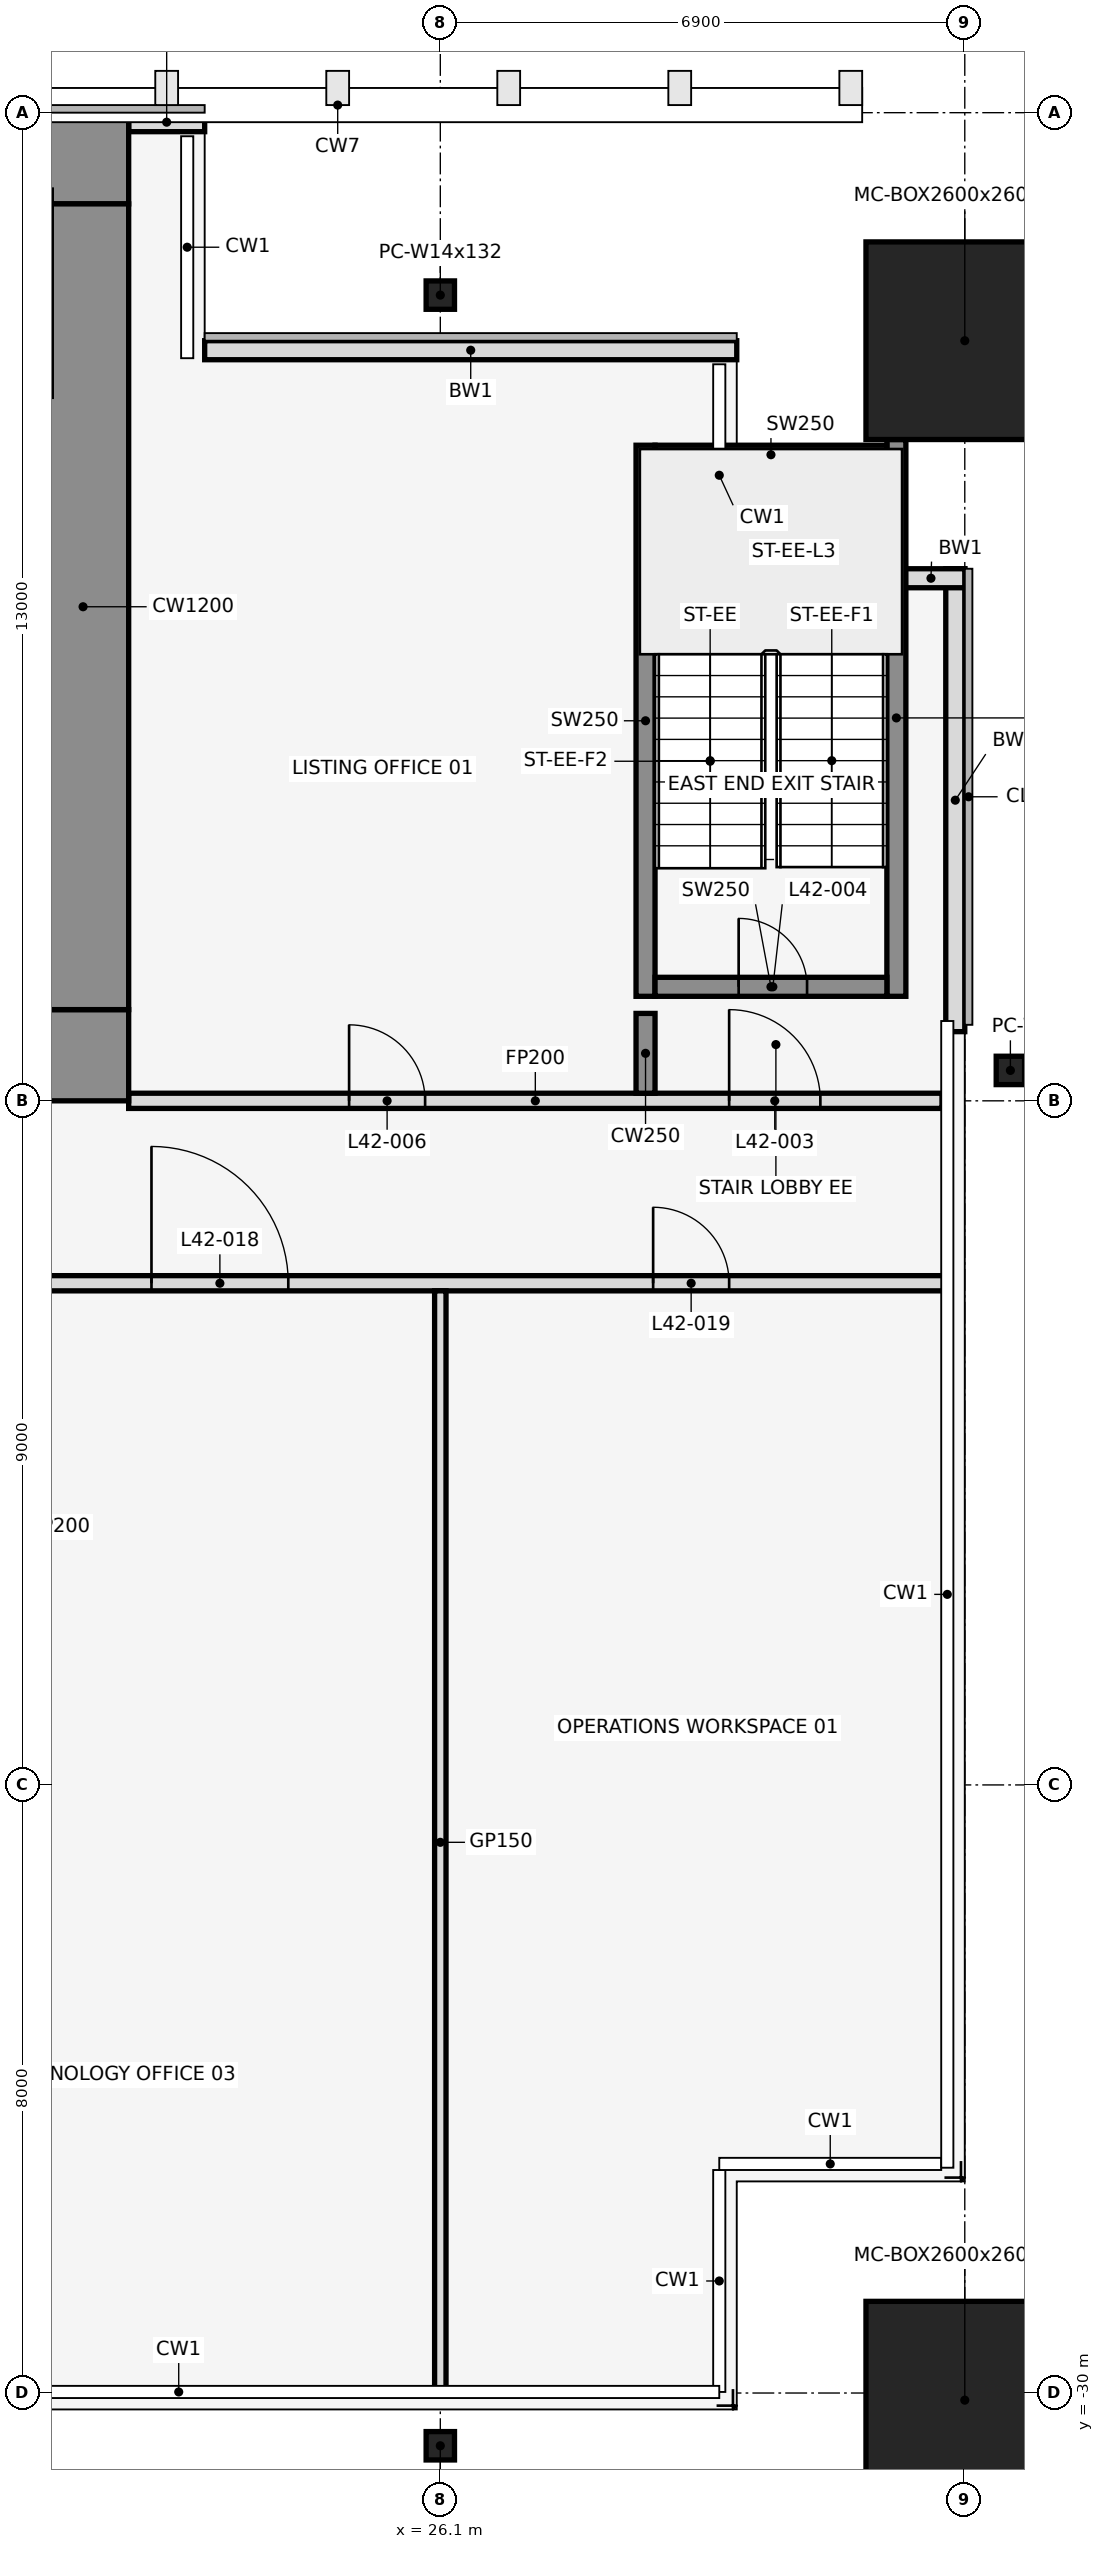
"""IFC4 building model, lengths in metres.
Left out: names, types, materials, properties, quantities, classifications, styles, units other than length and angle.
Written with IfcOpenShell. Run it as: python <this file> out.ifc"""

import sys

from ifc_helpers import new_model, si_unit, direction, frame, frame_2d, origin, origin_2d, place, context, subcontext, project, spatial, rectangle, hollow_rectangle, i_section, extrude, element, fill, save


model = new_model("IFC4")
c1 = context("Model", 3, precision=1e-05, world=origin(), true_north=direction((0.0, 1.0)))
c2 = subcontext(c1, "Body", "Model", "MODEL_VIEW")
j1 = project(units=[si_unit("LENGTHUNIT", "METRE"), si_unit("PLANEANGLEUNIT", "RADIAN")], contexts=[c1])
p1 = place(None, origin())
s1 = spatial("IfcSite", under=j1, at=p1, CompositionType="ELEMENT")
p2 = place(p1, origin())
s2 = spatial("IfcBuilding", under=s1, at=p2, CompositionType="ELEMENT")
p3 = place(p2, frame((0.0, 0.0, 190.9)))
s3 = spatial("IfcBuildingStorey", under=s2, at=p3, CompositionType="ELEMENT", Elevation=190.9)
for number, where, z_axis, x_axis in (
    (1, (26.1, -30.694, 0.0), (0.0, 0.0, 1.0), (1.0, 0.0, 0.0)),
    (2, (26.1, -2.4, 0.0), (0.0, 0.0, 1.0), (1.0, 0.0, 0.0)),
):
    element("IfcColumn", number, at=place(p3, frame(where, z_axis=z_axis, x_axis=x_axis)), inside=s3, PredefinedType="COLUMN", context=c2, shape_type="SweptSolid", body=[
        extrude(i_section(OverallWidth=0.373, OverallDepth=0.373, WebThickness=0.016, FlangeThickness=0.026, at=origin_2d()), origin(), (0.0, 0.0, 1.0), 4.1),
    ])
for number, where, z_axis, x_axis in (
    (3, (33.0, -30.094, 0.0), (0.0, 0.0, 1.0), (1.0, 0.0, 0.0)),
    (4, (33.0, -3.0, 0.0), (0.0, 0.0, 1.0), (1.0, 0.0, 0.0)),
):
    element("IfcColumn", number, at=place(p3, frame(where, z_axis=z_axis, x_axis=x_axis)), inside=s3, PredefinedType="COLUMN", context=c2, shape_type="SweptSolid", body=[
        extrude(hollow_rectangle(XDim=2.6, YDim=2.6, WallThickness=0.07, at=origin_2d()), origin(), (0.0, 0.0, 1.0), 4.1),
    ])
p4 = place(p3, frame((33.6, -12.6, 0.0), z_axis=(0.0, 0.0, 1.0), x_axis=(1.0, 0.0, 0.0)))
e5 = element("IfcColumn", 5, at=p4, inside=s3, PredefinedType="COLUMN", context=c2, shape_type="SweptSolid", body=[
    extrude(i_section(OverallWidth=0.373, OverallDepth=0.373, WebThickness=0.016, FlangeThickness=0.026, at=origin_2d()), origin(), (0.0, 0.0, 1.0), 4.1),
])
p5 = place(p3, frame((32.875, -12.09, 0.0), z_axis=(0.0, 0.0, 1.0), x_axis=(0.0, 1.0, 0.0)))
e6 = element("IfcWall", 6, at=p5, inside=s3, PredefinedType="STANDARD", context=c2, shape_type="SweptSolid", body=[
    extrude(rectangle(XDim=6.09, YDim=0.25, at=frame_2d((3.045, 0.0))), origin(), (0.0, 0.0, 1.0), 3.95),
])
p6 = place(p3, frame((33.0, -6.125, 0.0), z_axis=(0.0, 0.0, 1.0), x_axis=(-1.0, 0.0, 0.0)))
e7 = element("IfcWall", 7, at=p6, inside=s3, PredefinedType="STANDARD", context=c2, shape_type="SweptSolid", body=[
    extrude(rectangle(XDim=0.89, YDim=0.25, at=frame_2d((0.445, 0.0))), origin(), (0.0, 0.0, 1.0), 3.95),
])
p7 = place(p3, frame((30.0, -3.125, 0.0), z_axis=(0.0, 0.0, 1.0), x_axis=(-1.0, 0.0, 0.0)))
e8 = element("IfcWall", 8, at=p7, inside=s3, PredefinedType="STANDARD", context=c2, shape_type="SweptSolid", body=[
    extrude(rectangle(XDim=7.0, YDim=0.25, at=frame_2d((3.5, 0.0))), origin(), (0.0, 0.0, 1.0), 3.95),
])
p8 = place(p3, frame((23.0, -0.125, 0.0), z_axis=(0.0, 0.0, 1.0), x_axis=(-1.0, 0.0, 0.0)))
e9 = element("IfcWall", 9, at=p8, inside=s3, PredefinedType="STANDARD", context=c2, shape_type="SweptSolid", body=[
    extrude(rectangle(XDim=1.0, YDim=0.25, at=frame_2d((0.5, 0.0))), origin(), (0.0, 0.0, 1.0), 3.95),
])
p9 = place(p3, frame((28.8, -11.625, 0.0), z_axis=(0.0, 0.0, 1.0), x_axis=(0.0, 1.0, 0.0)))
e10 = element("IfcWall", 10, at=p9, inside=s3, PredefinedType="SHEAR", context=c2, shape_type="SweptSolid", body=[
    extrude(rectangle(XDim=7.25, YDim=0.25, at=frame_2d((3.625, 0.0))), origin(), (0.0, 0.0, 1.0), 4.1),
])
p10 = place(p3, frame((32.1, -11.625, 0.0), z_axis=(0.0, 0.0, 1.0), x_axis=(0.0, 1.0, 0.0)))
e11 = element("IfcWall", 11, at=p10, inside=s3, PredefinedType="SHEAR", context=c2, shape_type="SweptSolid", body=[
    extrude(rectangle(XDim=7.325, YDim=0.25, at=frame_2d((3.663, 0.0))), origin(), (0.0, 0.0, 1.0), 4.1),
])
p11 = place(p3, frame((28.925, -11.5, 0.0), z_axis=(0.0, 0.0, 1.0), x_axis=(1.0, 0.0, 0.0)))
e12 = element("IfcWall", 12, at=p11, inside=s3, PredefinedType="SHEAR", context=c2, shape_type="SweptSolid", body=[
    extrude(rectangle(XDim=3.05, YDim=0.25, at=frame_2d((1.525, 0.0))), origin(), (0.0, 0.0, 1.0), 4.1),
])
p12 = place(p11, frame((1.1, 0.0, 0.0)))
e13 = element("IfcOpeningElement", 13, at=p12, cuts=e12, PredefinedType="OPENING", context=c2, shape_type="SweptSolid", body=[
    extrude(rectangle(XDim=0.9, YDim=2.1, at=frame_2d((0.45, 1.05))), frame((0.0, 0.137, 0.0), z_axis=(0.0, -1.0, 0.0), x_axis=(1.0, 0.0, 0.0)), (0.0, 0.0, 1.0), 0.274),
])
p13 = place(p3, frame((28.925, -4.5, 0.0), z_axis=(0.0, 0.0, 1.0), x_axis=(1.0, 0.0, 0.0)))
e14 = element("IfcWall", 14, at=p13, inside=s3, PredefinedType="SHEAR", context=c2, shape_type="SweptSolid", body=[
    extrude(rectangle(XDim=3.05, YDim=0.25, at=frame_2d((1.525, 0.0))), origin(), (0.0, 0.0, 1.0), 4.1),
])
p14 = place(p3, frame((-32.79, -15.4, 0.0), z_axis=(0.0, 0.0, 1.0), x_axis=(1.0, 0.0, 0.0)))
e15 = element("IfcWall", 15, at=p14, inside=s3, PredefinedType="PARTITIONING", context=c2, shape_type="SweptSolid", body=[
    extrude(rectangle(XDim=65.58, YDim=0.2, at=frame_2d((32.79, 0.0))), origin(), (0.0, 0.0, 1.0), 2.96),
])
p15 = place(p14, frame((1.4, 0.0, 0.0)))
e16 = element("IfcOpeningElement", 16, at=p15, cuts=e15, PredefinedType="OPENING", context=c2, shape_type="SweptSolid", body=[
    extrude(rectangle(XDim=1.0, YDim=2.1, at=frame_2d((0.5, 1.05))), frame((0.0, 0.112, 0.0), z_axis=(0.0, -1.0, 0.0), x_axis=(1.0, 0.0, 0.0)), (0.0, 0.0, 1.0), 0.224),
])
p16 = place(p14, frame((4.69, 0.0, 0.0)))
e17 = element("IfcOpeningElement", 17, at=p16, cuts=e15, PredefinedType="OPENING", context=c2, shape_type="SweptSolid", body=[
    extrude(rectangle(XDim=1.0, YDim=2.1, at=frame_2d((0.5, 1.05))), frame((0.0, 0.112, 0.0), z_axis=(0.0, -1.0, 0.0), x_axis=(1.0, 0.0, 0.0)), (0.0, 0.0, 1.0), 0.224),
])
p17 = place(p14, frame((10.59, 0.0, 0.0)))
e18 = element("IfcOpeningElement", 18, at=p17, cuts=e15, PredefinedType="OPENING", context=c2, shape_type="SweptSolid", body=[
    extrude(rectangle(XDim=1.0, YDim=2.1, at=frame_2d((0.5, 1.05))), frame((0.0, 0.112, 0.0), z_axis=(0.0, -1.0, 0.0), x_axis=(1.0, 0.0, 0.0)), (0.0, 0.0, 1.0), 0.224),
])
p18 = place(p14, frame((16.29, 0.0, 0.0)))
e19 = element("IfcOpeningElement", 19, at=p18, cuts=e15, PredefinedType="OPENING", context=c2, shape_type="SweptSolid", body=[
    extrude(rectangle(XDim=1.0, YDim=2.1, at=frame_2d((0.5, 1.05))), frame((0.0, 0.112, 0.0), z_axis=(0.0, -1.0, 0.0), x_axis=(1.0, 0.0, 0.0)), (0.0, 0.0, 1.0), 0.224),
])
p19 = place(p14, frame((23.19, 0.0, 0.0)))
e20 = element("IfcOpeningElement", 20, at=p19, cuts=e15, PredefinedType="OPENING", context=c2, shape_type="SweptSolid", body=[
    extrude(rectangle(XDim=1.8, YDim=2.1, at=frame_2d((0.9, 1.05))), frame((0.0, 0.112, 0.0), z_axis=(0.0, -1.0, 0.0), x_axis=(1.0, 0.0, 0.0)), (0.0, 0.0, 1.0), 0.224),
])
p20 = place(p14, frame((33.29, 0.0, 0.0)))
e21 = element("IfcOpeningElement", 21, at=p20, cuts=e15, PredefinedType="OPENING", context=c2, shape_type="SweptSolid", body=[
    extrude(rectangle(XDim=1.8, YDim=2.1, at=frame_2d((0.9, 1.05))), frame((0.0, 0.112, 0.0), z_axis=(0.0, -1.0, 0.0), x_axis=(1.0, 0.0, 0.0)), (0.0, 0.0, 1.0), 0.224),
])
p21 = place(p14, frame((40.99, 0.0, 0.0)))
e22 = element("IfcOpeningElement", 22, at=p21, cuts=e15, PredefinedType="OPENING", context=c2, shape_type="SweptSolid", body=[
    extrude(rectangle(XDim=1.0, YDim=2.1, at=frame_2d((0.5, 1.05))), frame((0.0, 0.112, 0.0), z_axis=(0.0, -1.0, 0.0), x_axis=(1.0, 0.0, 0.0)), (0.0, 0.0, 1.0), 0.224),
])
p22 = place(p14, frame((48.29, 0.0, 0.0)))
e23 = element("IfcOpeningElement", 23, at=p22, cuts=e15, PredefinedType="OPENING", context=c2, shape_type="SweptSolid", body=[
    extrude(rectangle(XDim=0.9, YDim=2.1, at=frame_2d((0.45, 1.05))), frame((0.0, 0.112, 0.0), z_axis=(0.0, -1.0, 0.0), x_axis=(1.0, 0.0, 0.0)), (0.0, 0.0, 1.0), 0.224),
])
p23 = place(p14, frame((55.09, 0.0, 0.0)))
e24 = element("IfcOpeningElement", 24, at=p23, cuts=e15, PredefinedType="OPENING", context=c2, shape_type="SweptSolid", body=[
    extrude(rectangle(XDim=1.8, YDim=2.1, at=frame_2d((0.9, 1.05))), frame((0.0, 0.112, 0.0), z_axis=(0.0, -1.0, 0.0), x_axis=(1.0, 0.0, 0.0)), (0.0, 0.0, 1.0), 0.224),
])
p24 = place(p14, frame((61.69, 0.0, 0.0)))
e25 = element("IfcOpeningElement", 25, at=p24, cuts=e15, PredefinedType="OPENING", context=c2, shape_type="SweptSolid", body=[
    extrude(rectangle(XDim=1.0, YDim=2.1, at=frame_2d((0.5, 1.05))), frame((0.0, 0.112, 0.0), z_axis=(0.0, -1.0, 0.0), x_axis=(1.0, 0.0, 0.0)), (0.0, 0.0, 1.0), 0.224),
])
p25 = place(p3, frame((22.0, -13.0, 0.0), z_axis=(0.0, 0.0, 1.0), x_axis=(1.0, 0.0, 0.0)))
e26 = element("IfcWall", 26, at=p25, inside=s3, PredefinedType="PARTITIONING", context=c2, shape_type="SweptSolid", body=[
    extrude(rectangle(XDim=10.7, YDim=0.2, at=frame_2d((5.35, 0.0))), origin(), (0.0, 0.0, 1.0), 2.96),
])
p26 = place(p25, frame((7.9, 0.0, 0.0)))
e27 = element("IfcOpeningElement", 27, at=p26, cuts=e26, PredefinedType="OPENING", context=c2, shape_type="SweptSolid", body=[
    extrude(rectangle(XDim=1.2, YDim=2.1, at=frame_2d((0.6, 1.05))), frame((0.0, 0.112, 0.0), z_axis=(0.0, -1.0, 0.0), x_axis=(1.0, 0.0, 0.0)), (0.0, 0.0, 1.0), 0.224),
])
p27 = place(p25, frame((2.9, 0.0, 0.0)))
e28 = element("IfcOpeningElement", 28, at=p27, cuts=e26, PredefinedType="OPENING", context=c2, shape_type="SweptSolid", body=[
    extrude(rectangle(XDim=1.0, YDim=2.1, at=frame_2d((0.5, 1.05))), frame((0.0, 0.112, 0.0), z_axis=(0.0, -1.0, 0.0), x_axis=(1.0, 0.0, 0.0)), (0.0, 0.0, 1.0), 0.224),
])
p28 = place(p3, frame((26.1, -30.01, 0.0), z_axis=(0.0, 0.0, 1.0), x_axis=(0.0, 1.0, 0.0)))
e29 = element("IfcWall", 29, at=p28, inside=s3, PredefinedType="PARTITIONING", context=c2, shape_type="SweptSolid", body=[
    extrude(rectangle(XDim=14.51, YDim=0.15, at=frame_2d((7.255, 0.0))), origin(), (0.0, 0.0, 1.0), 2.96),
])
p29 = place(p3, frame((28.8, -12.9, 0.0), z_axis=(0.0, 0.0, 1.0), x_axis=(0.0, 1.0, 0.0)))
e30 = element("IfcWall", 30, at=p29, inside=s3, PredefinedType="SHEAR", context=c2, shape_type="SweptSolid", body=[
    extrude(rectangle(XDim=1.05, YDim=0.25, at=frame_2d((0.525, 0.0))), origin(), (0.0, 0.0, 1.0), 4.1),
])
p30 = place(p3, frame((-22.0, -0.6, 0.0), z_axis=(0.0, 0.0, 1.0), x_axis=(1.0, 0.0, 0.0)))
e31 = element("IfcWall", 31, at=p30, inside=s3, PredefinedType="SHEAR", context=c2, shape_type="SweptSolid", body=[
    extrude(rectangle(XDim=44.0, YDim=1.2, at=frame_2d((22.0, 0.0))), origin(), (0.0, 0.0, 1.0), 4.1),
])
p31 = place(p30, frame((18.55, 0.0, 0.0)))
e32 = element("IfcOpeningElement", 32, at=p31, cuts=e31, PredefinedType="OPENING", context=c2, shape_type="SweptSolid", body=[
    extrude(rectangle(XDim=0.9, YDim=2.1, at=frame_2d((0.45, 1.05))), frame((0.0, 0.612, 0.0), z_axis=(0.0, -1.0, 0.0), x_axis=(1.0, 0.0, 0.0)), (0.0, 0.0, 1.0), 1.224),
])
p32 = place(p30, frame((24.55, 0.0, 0.0)))
e33 = element("IfcOpeningElement", 33, at=p32, cuts=e31, PredefinedType="OPENING", context=c2, shape_type="SweptSolid", body=[
    extrude(rectangle(XDim=0.9, YDim=2.1, at=frame_2d((0.45, 1.05))), frame((0.0, 0.612, 0.0), z_axis=(0.0, -1.0, 0.0), x_axis=(1.0, 0.0, 0.0)), (0.0, 0.0, 1.0), 1.224),
])
p33 = place(p3, frame((-22.0, -12.4, 0.0), z_axis=(0.0, 0.0, 1.0), x_axis=(1.0, 0.0, 0.0)))
e34 = element("IfcWall", 34, at=p33, inside=s3, PredefinedType="SHEAR", context=c2, shape_type="SweptSolid", body=[
    extrude(rectangle(XDim=44.0, YDim=1.2, at=frame_2d((22.0, 0.0))), origin(), (0.0, 0.0, 1.0), 4.1),
])
p34 = place(p33, frame((2.2, 0.0, 0.0)))
e35 = element("IfcOpeningElement", 35, at=p34, cuts=e34, PredefinedType="OPENING", context=c2, shape_type="SweptSolid", body=[
    extrude(rectangle(XDim=1.2, YDim=2.1, at=frame_2d((0.6, 1.05))), frame((0.0, 0.612, 0.0), z_axis=(0.0, -1.0, 0.0), x_axis=(1.0, 0.0, 0.0)), (0.0, 0.0, 1.0), 1.224),
])
p35 = place(p33, frame((21.4, 0.0, 0.0)))
e36 = element("IfcOpeningElement", 36, at=p35, cuts=e34, PredefinedType="OPENING", context=c2, shape_type="SweptSolid", body=[
    extrude(rectangle(XDim=1.2, YDim=2.1, at=frame_2d((0.6, 1.05))), frame((0.0, 0.612, 0.0), z_axis=(0.0, -1.0, 0.0), x_axis=(1.0, 0.0, 0.0)), (0.0, 0.0, 1.0), 1.224),
])
p36 = place(p33, frame((40.6, 0.0, 0.0)))
e37 = element("IfcOpeningElement", 37, at=p36, cuts=e34, PredefinedType="OPENING", context=c2, shape_type="SweptSolid", body=[
    extrude(rectangle(XDim=1.2, YDim=2.1, at=frame_2d((0.6, 1.05))), frame((0.0, 0.612, 0.0), z_axis=(0.0, -1.0, 0.0), x_axis=(1.0, 0.0, 0.0)), (0.0, 0.0, 1.0), 1.224),
])
p37 = place(p33, frame((16.0, 0.0, 0.0)))
e38 = element("IfcOpeningElement", 38, at=p37, cuts=e34, PredefinedType="OPENING", context=c2, shape_type="SweptSolid", body=[
    extrude(rectangle(XDim=1.8, YDim=2.1, at=frame_2d((0.9, 1.05))), frame((0.0, 0.612, 0.0), z_axis=(0.0, -1.0, 0.0), x_axis=(1.0, 0.0, 0.0)), (0.0, 0.0, 1.0), 1.224),
])
p38 = place(p33, frame((6.3, 0.0, 0.0)))
e39 = element("IfcOpeningElement", 39, at=p38, cuts=e34, PredefinedType="OPENING", context=c2, shape_type="SweptSolid", body=[
    extrude(rectangle(XDim=1.2, YDim=2.1, at=frame_2d((0.6, 1.05))), frame((0.0, 0.612, 0.0), z_axis=(0.0, -1.0, 0.0), x_axis=(1.0, 0.0, 0.0)), (0.0, 0.0, 1.0), 1.224),
])
p39 = place(p33, frame((26.2, 0.0, 0.0)))
e40 = element("IfcOpeningElement", 40, at=p39, cuts=e34, PredefinedType="OPENING", context=c2, shape_type="SweptSolid", body=[
    extrude(rectangle(XDim=1.8, YDim=2.1, at=frame_2d((0.9, 1.05))), frame((0.0, 0.612, 0.0), z_axis=(0.0, -1.0, 0.0), x_axis=(1.0, 0.0, 0.0)), (0.0, 0.0, 1.0), 1.224),
])
p40 = place(p33, frame((36.5, 0.0, 0.0)))
e41 = element("IfcOpeningElement", 41, at=p40, cuts=e34, PredefinedType="OPENING", context=c2, shape_type="SweptSolid", body=[
    extrude(rectangle(XDim=1.2, YDim=2.1, at=frame_2d((0.6, 1.05))), frame((0.0, 0.612, 0.0), z_axis=(0.0, -1.0, 0.0), x_axis=(1.0, 0.0, 0.0)), (0.0, 0.0, 1.0), 1.224),
])
p41 = place(p3, frame((21.4, -11.8, 0.0), z_axis=(0.0, 0.0, 1.0), x_axis=(0.0, 1.0, 0.0)))
e42 = element("IfcWall", 42, at=p41, inside=s3, PredefinedType="SHEAR", context=c2, shape_type="SweptSolid", body=[
    extrude(rectangle(XDim=10.6, YDim=1.2, at=frame_2d((5.3, 0.0))), origin(), (0.0, 0.0, 1.0), 4.1),
])
p42 = place(p26, origin())
e43 = element("IfcDoor", 43, at=p42, inside=s3, OperationType="SINGLE_SWING_RIGHT", PredefinedType="DOOR", context=c2, shape_type="SweptSolid", body=[
    extrude(rectangle(XDim=1.2, YDim=2.1, at=frame_2d((0.6, 1.05))), frame((0.0, 0.025, 0.0), z_axis=(0.0, -1.0, 0.0), x_axis=(1.0, 0.0, 0.0)), (0.0, 0.0, 1.0), 0.05),
])
fill(e27, e43)
p43 = place(p12, origin())
e44 = element("IfcDoor", 44, at=p43, inside=s3, OperationType="SINGLE_SWING_LEFT", PredefinedType="DOOR", context=c2, shape_type="SweptSolid", body=[
    extrude(rectangle(XDim=0.9, YDim=2.1, at=frame_2d((0.45, 1.05))), frame((0.0, 0.025, 0.0), z_axis=(0.0, -1.0, 0.0), x_axis=(1.0, 0.0, 0.0)), (0.0, 0.0, 1.0), 0.05),
])
fill(e13, e44)
p44 = place(p27, origin())
e45 = element("IfcDoor", 45, at=p44, inside=s3, OperationType="SINGLE_SWING_RIGHT", PredefinedType="DOOR", context=c2, shape_type="SweptSolid", body=[
    extrude(rectangle(XDim=1.0, YDim=2.1, at=frame_2d((0.5, 1.05))), frame((0.0, 0.025, 0.0), z_axis=(0.0, -1.0, 0.0), x_axis=(1.0, 0.0, 0.0)), (0.0, 0.0, 1.0), 0.05),
])
fill(e28, e45)
p45 = place(p23, origin())
e46 = element("IfcDoor", 46, at=p45, inside=s3, OperationType="SINGLE_SWING_LEFT", PredefinedType="DOOR", context=c2, shape_type="SweptSolid", body=[
    extrude(rectangle(XDim=1.8, YDim=2.1, at=frame_2d((0.9, 1.05))), frame((0.0, 0.025, 0.0), z_axis=(0.0, -1.0, 0.0), x_axis=(1.0, 0.0, 0.0)), (0.0, 0.0, 1.0), 0.05),
])
fill(e24, e46)
p46 = place(p24, frame((1.0, 0.0, 0.0), z_axis=(0.0, 0.0, 1.0), x_axis=(-1.0, 0.0, 0.0)))
e47 = element("IfcDoor", 47, at=p46, inside=s3, OperationType="SINGLE_SWING_LEFT", PredefinedType="DOOR", context=c2, shape_type="SweptSolid", body=[
    extrude(rectangle(XDim=1.0, YDim=2.1, at=frame_2d((0.5, 1.05))), frame((0.0, 0.025, 0.0), z_axis=(0.0, -1.0, 0.0), x_axis=(1.0, 0.0, 0.0)), (0.0, 0.0, 1.0), 0.05),
])
fill(e25, e47)
save(model, sys.argv[1])
